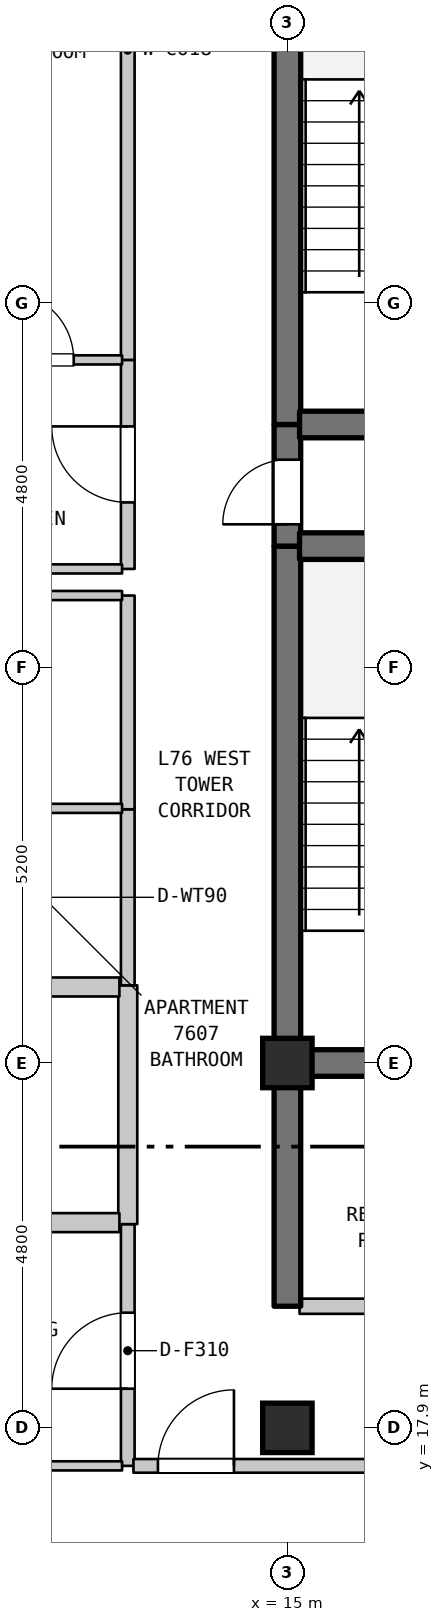
"""IFC4 building model, lengths in metres.
Left out: names, types, materials, properties, quantities, classifications, styles, units other than length and angle.
Written with IfcOpenShell. Run it as: python <this file> out.ifc"""

import sys

from ifc_helpers import new_model, si_unit, direction, frame, frame_2d, origin, origin_2d, place, context, subcontext, project, spatial, rectangle, extrude, element, fill, save


model = new_model("IFC4")
c1 = context("Model", 3, precision=1e-05, world=origin(), true_north=direction((0.0, 1.0)))
c2 = subcontext(c1, "Body", "Model", "MODEL_VIEW")
j1 = project(units=[si_unit("LENGTHUNIT", "METRE"), si_unit("PLANEANGLEUNIT", "RADIAN")], contexts=[c1])
p1 = place(None, origin())
s1 = spatial("IfcSite", under=j1, at=p1, CompositionType="ELEMENT")
p2 = place(p1, origin())
s2 = spatial("IfcBuilding", under=s1, at=p2, CompositionType="ELEMENT")
p3 = place(p2, frame((0.0, 0.0, 303.6)))
s3 = spatial("IfcBuildingStorey", under=s2, at=p3, CompositionType="ELEMENT", Elevation=303.6)
for number, where, z_axis, x_axis in (
    (1, (15.0, 17.9, 0.0), (0.0, 0.0, 1.0), (1.0, 0.0, 0.0)),
    (2, (15.0, 22.7, 0.0), (0.0, 0.0, 1.0), (1.0, 0.0, 0.0)),
):
    element("IfcColumn", number, at=place(p3, frame(where, z_axis=z_axis, x_axis=x_axis)), inside=s3, PredefinedType="COLUMN", context=c2, shape_type="SweptSolid", body=[
        extrude(rectangle(XDim=0.65, YDim=0.65, at=origin_2d()), origin(), (0.0, 0.0, 1.0), 3.7),
    ])
p4 = place(p3, frame((12.9, 17.4, 0.0), z_axis=(0.0, 0.0, 1.0), x_axis=(0.0, 1.0, 0.0)))
e3 = element("IfcWall", 3, at=p4, inside=s3, PredefinedType="STANDARD", context=c2, shape_type="SweptSolid", body=[
    extrude(rectangle(XDim=3.18, YDim=0.18, at=frame_2d((1.59, 0.0))), origin(), (0.0, 0.0, 1.0), 3.39),
])
p5 = place(p4, frame((1.015, 0.0, 0.0)))
e4 = element("IfcOpeningElement", 4, at=p5, cuts=e3, PredefinedType="OPENING", context=c2, shape_type="SweptSolid", body=[
    extrude(rectangle(XDim=1.0, YDim=2.15, at=frame_2d((0.5, 1.075))), frame((0.0, 0.1, 0.0), z_axis=(0.0, -1.0, 0.0), x_axis=(1.0, 0.0, 0.0)), (0.0, 0.0, 1.0), 0.2),
])
p6 = place(p3, frame((12.9, 20.58, 0.0), z_axis=(0.0, 0.0, 1.0), x_axis=(0.0, 1.0, 0.0)))
e5 = element("IfcWall", 5, at=p6, inside=s3, PredefinedType="STANDARD", context=c2, shape_type="SweptSolid", body=[
    extrude(rectangle(XDim=3.142, YDim=0.25, at=frame_2d((1.571, 0.0))), origin(), (0.0, 0.0, 1.0), 3.39),
])
p7 = place(p3, frame((12.9, 23.722, 0.0), z_axis=(0.0, 0.0, 1.0), x_axis=(0.0, 1.0, 0.0)))
e6 = element("IfcWall", 6, at=p7, inside=s3, PredefinedType="STANDARD", context=c2, shape_type="SweptSolid", body=[
    extrude(rectangle(XDim=2.316, YDim=0.18, at=frame_2d((1.158, 0.0))), origin(), (0.0, 0.0, 1.0), 3.39),
])
p8 = place(p3, frame((12.9, 26.038, 0.0), z_axis=(0.0, 0.0, 1.0), x_axis=(0.0, 1.0, 0.0)))
e7 = element("IfcWall", 7, at=p8, inside=s3, PredefinedType="STANDARD", context=c2, shape_type="SweptSolid", body=[
    extrude(rectangle(XDim=2.812, YDim=0.18, at=frame_2d((1.406, 0.0))), origin(), (0.0, 0.0, 1.0), 3.39),
])
p9 = place(p3, frame((12.9, 29.2, 0.0), z_axis=(0.0, 0.0, 1.0), x_axis=(0.0, 1.0, 0.0)))
e8 = element("IfcWall", 8, at=p9, inside=s3, PredefinedType="STANDARD", context=c2, shape_type="SweptSolid", body=[
    extrude(rectangle(XDim=2.75, YDim=0.18, at=frame_2d((1.375, 0.0))), origin(), (0.0, 0.0, 1.0), 3.39),
])
p10 = place(p9, frame((0.875, 0.0, 0.0)))
e9 = element("IfcOpeningElement", 9, at=p10, cuts=e8, PredefinedType="OPENING", context=c2, shape_type="SweptSolid", body=[
    extrude(rectangle(XDim=1.0, YDim=2.15, at=frame_2d((0.5, 1.075))), frame((0.0, 0.1, 0.0), z_axis=(0.0, -1.0, 0.0), x_axis=(1.0, 0.0, 0.0)), (0.0, 0.0, 1.0), 0.2),
])
p11 = place(p3, frame((12.9, 31.95, 0.0), z_axis=(0.0, 0.0, 1.0), x_axis=(0.0, 1.0, 0.0)))
e10 = element("IfcWall", 10, at=p11, inside=s3, PredefinedType="STANDARD", context=c2, shape_type="SweptSolid", body=[
    extrude(rectangle(XDim=8.15, YDim=0.18, at=frame_2d((4.075, 0.0))), origin(), (0.0, 0.0, 1.0), 3.39),
])
p12 = place(p3, frame((15.0, 19.5, 0.0), z_axis=(0.0, 0.0, 1.0), x_axis=(0.0, 1.0, 0.0)))
e11 = element("IfcWall", 11, at=p12, inside=s3, PredefinedType="SHEAR", context=c2, shape_type="SweptSolid", body=[
    extrude(rectangle(XDim=3.2, YDim=0.35, at=frame_2d((1.6, 0.0))), origin(), (0.0, 0.0, 1.0), 3.39),
])
p13 = place(p3, frame((15.0, 22.7, 0.0), z_axis=(0.0, 0.0, 1.0), x_axis=(0.0, 1.0, 0.0)))
e12 = element("IfcWall", 12, at=p13, inside=s3, PredefinedType="SHEAR", context=c2, shape_type="SweptSolid", body=[
    extrude(rectangle(XDim=6.8, YDim=0.35, at=frame_2d((3.4, 0.0))), origin(), (0.0, 0.0, 1.0), 3.39),
])
p14 = place(p3, frame((15.0, 29.5, 0.0), z_axis=(0.0, 0.0, 1.0), x_axis=(0.0, 1.0, 0.0)))
e13 = element("IfcWall", 13, at=p14, inside=s3, PredefinedType="SHEAR", context=c2, shape_type="SweptSolid", body=[
    extrude(rectangle(XDim=1.6, YDim=0.35, at=frame_2d((0.8, 0.0))), origin(), (0.0, 0.0, 1.0), 3.39),
])
p15 = place(p14, frame((0.287, 0.0, 0.0)))
e14 = element("IfcOpeningElement", 14, at=p15, cuts=e13, PredefinedType="OPENING", context=c2, shape_type="SweptSolid", body=[
    extrude(rectangle(XDim=0.85, YDim=2.1, at=frame_2d((0.425, 1.05))), frame((0.0, 0.185, 0.0), z_axis=(0.0, -1.0, 0.0), x_axis=(1.0, 0.0, 0.0)), (0.0, 0.0, 1.0), 0.37),
])
p16 = place(p3, frame((15.0, 31.1, 0.0), z_axis=(0.0, 0.0, 1.0), x_axis=(0.0, 1.0, 0.0)))
e15 = element("IfcWall", 15, at=p16, inside=s3, PredefinedType="SHEAR", context=c2, shape_type="SweptSolid", body=[
    extrude(rectangle(XDim=6.8, YDim=0.35, at=frame_2d((3.4, 0.0))), origin(), (0.0, 0.0, 1.0), 3.39),
])
p17 = place(p3, frame((8.973, 17.4, 0.0), z_axis=(0.0, 0.0, 1.0), x_axis=(1.0, 0.0, 0.0)))
e16 = element("IfcWall", 16, at=p17, inside=s3, PredefinedType="PARTITIONING", context=c2, shape_type="SweptSolid", body=[
    extrude(rectangle(XDim=3.852, YDim=0.12, at=frame_2d((1.926, 0.0))), origin(), (0.0, 0.0, 1.0), 3.39),
])
p18 = place(p3, frame((12.975, 17.4, 0.0), z_axis=(0.0, 0.0, 1.0), x_axis=(1.0, 0.0, 0.0)))
e17 = element("IfcWall", 17, at=p18, inside=s3, PredefinedType="STANDARD", context=c2, shape_type="SweptSolid", body=[
    extrude(rectangle(XDim=3.68, YDim=0.18, at=frame_2d((1.84, 0.0))), origin(), (0.0, 0.0, 1.0), 3.39),
])
p19 = place(p18, frame((0.322, 0.0, 0.0)))
e18 = element("IfcOpeningElement", 18, at=p19, cuts=e17, PredefinedType="OPENING", context=c2, shape_type="SweptSolid", body=[
    extrude(rectangle(XDim=1.0, YDim=2.15, at=frame_2d((0.5, 1.075))), frame((0.0, 0.1, 0.0), z_axis=(0.0, -1.0, 0.0), x_axis=(1.0, 0.0, 0.0)), (0.0, 0.0, 1.0), 0.2),
])
p20 = place(p3, frame((15.16, 19.5, 0.0), z_axis=(0.0, 0.0, 1.0), x_axis=(1.0, 0.0, 0.0)))
e19 = element("IfcWall", 19, at=p20, inside=s3, PredefinedType="STANDARD", context=c2, shape_type="SweptSolid", body=[
    extrude(rectangle(XDim=3.68, YDim=0.2, at=frame_2d((1.84, 0.0))), origin(), (0.0, 0.0, 1.0), 3.39),
])
p21 = place(p20, frame((1.39, 0.0, 0.0)))
e20 = element("IfcOpeningElement", 20, at=p21, cuts=e19, PredefinedType="OPENING", context=c2, shape_type="SweptSolid", body=[
    extrude(rectangle(XDim=0.9, YDim=2.15, at=frame_2d((0.45, 1.075))), frame((0.0, 0.11, 0.0), z_axis=(0.0, -1.0, 0.0), x_axis=(1.0, 0.0, 0.0)), (0.0, 0.0, 1.0), 0.22),
])
p22 = place(p3, frame((10.76, 20.6, 0.0), z_axis=(0.0, 0.0, 1.0), x_axis=(1.0, 0.0, 0.0)))
e21 = element("IfcWall", 21, at=p22, inside=s3, PredefinedType="STANDARD", context=c2, shape_type="SweptSolid", body=[
    extrude(rectangle(XDim=2.03, YDim=0.25, at=frame_2d((1.015, 0.0))), origin(), (0.0, 0.0, 1.0), 3.39),
])
p23 = place(p3, frame((15.16, 22.7, 0.0), z_axis=(0.0, 0.0, 1.0), x_axis=(1.0, 0.0, 0.0)))
e22 = element("IfcWall", 22, at=p23, inside=s3, PredefinedType="SHEAR", context=c2, shape_type="SweptSolid", body=[
    extrude(rectangle(XDim=3.68, YDim=0.35, at=frame_2d((1.84, 0.0))), origin(), (0.0, 0.0, 1.0), 3.39),
])
p24 = place(p3, frame((10.76, 23.7, 0.0), z_axis=(0.0, 0.0, 1.0), x_axis=(1.0, 0.0, 0.0)))
e23 = element("IfcWall", 23, at=p24, inside=s3, PredefinedType="STANDARD", context=c2, shape_type="SweptSolid", body=[
    extrude(rectangle(XDim=2.03, YDim=0.25, at=frame_2d((1.015, 0.0))), origin(), (0.0, 0.0, 1.0), 3.39),
])
for number, where, z_axis, x_axis in (
    (24, (10.695, 26.05, 0.0), (0.0, 0.0, 1.0), (1.0, 0.0, 0.0)),
    (25, (10.695, 28.85, 0.0), (0.0, 0.0, 1.0), (1.0, 0.0, 0.0)),
):
    element("IfcWall", number, at=place(p3, frame(where, z_axis=z_axis, x_axis=x_axis)), inside=s3, PredefinedType="PARTITIONING", context=c2, shape_type="SweptSolid", body=[
        extrude(rectangle(XDim=2.13, YDim=0.12, at=frame_2d((1.065, 0.0))), origin(), (0.0, 0.0, 1.0), 3.39),
    ])
p25 = place(p3, frame((9.13, 29.2, 0.0), z_axis=(0.0, 0.0, 1.0), x_axis=(1.0, 0.0, 0.0)))
e26 = element("IfcWall", 26, at=p25, inside=s3, PredefinedType="PARTITIONING", context=c2, shape_type="SweptSolid", body=[
    extrude(rectangle(XDim=3.695, YDim=0.12, at=frame_2d((1.848, 0.0))), origin(), (0.0, 0.0, 1.0), 3.39),
])
for number, where, z_axis, x_axis in (
    (27, (15.16, 29.5, 0.0), (0.0, 0.0, 1.0), (1.0, 0.0, 0.0)),
    (28, (15.16, 31.1, 0.0), (0.0, 0.0, 1.0), (1.0, 0.0, 0.0)),
):
    element("IfcWall", number, at=place(p3, frame(where, z_axis=z_axis, x_axis=x_axis)), inside=s3, PredefinedType="SHEAR", context=c2, shape_type="SweptSolid", body=[
        extrude(rectangle(XDim=3.68, YDim=0.35, at=frame_2d((1.84, 0.0))), origin(), (0.0, 0.0, 1.0), 3.39),
    ])
p26 = place(p3, frame((10.623, 31.95, 0.0), z_axis=(0.0, 0.0, 1.0), x_axis=(1.0, 0.0, 0.0)))
e29 = element("IfcWall", 29, at=p26, inside=s3, PredefinedType="PARTITIONING", context=c2, shape_type="SweptSolid", body=[
    extrude(rectangle(XDim=2.202, YDim=0.12, at=frame_2d((1.101, 0.0))), origin(), (0.0, 0.0, 1.0), 3.39),
])
p27 = place(p26, frame((0.666, 0.0, 0.0)))
e30 = element("IfcOpeningElement", 30, at=p27, cuts=e29, PredefinedType="OPENING", context=c2, shape_type="SweptSolid", body=[
    extrude(rectangle(XDim=0.9, YDim=2.1, at=frame_2d((0.45, 1.05))), frame((0.0, 0.07, 0.0), z_axis=(0.0, -1.0, 0.0), x_axis=(1.0, 0.0, 0.0)), (0.0, 0.0, 1.0), 0.14),
])
p28 = place(p5, origin())
e31 = element("IfcDoor", 31, at=p28, inside=s3, OperationType="SINGLE_SWING_LEFT", PredefinedType="DOOR", context=c2, shape_type="SweptSolid", body=[
    extrude(rectangle(XDim=1.0, YDim=2.15, at=frame_2d((0.5, 1.075))), frame((0.0, 0.025, 0.0), z_axis=(0.0, -1.0, 0.0), x_axis=(1.0, 0.0, 0.0)), (0.0, 0.0, 1.0), 0.05),
])
fill(e4, e31)
p29 = place(p10, origin())
e32 = element("IfcDoor", 32, at=p29, inside=s3, OperationType="SINGLE_SWING_RIGHT", PredefinedType="DOOR", context=c2, shape_type="SweptSolid", body=[
    extrude(rectangle(XDim=1.0, YDim=2.15, at=frame_2d((0.5, 1.075))), frame((0.0, 0.025, 0.0), z_axis=(0.0, -1.0, 0.0), x_axis=(1.0, 0.0, 0.0)), (0.0, 0.0, 1.0), 0.05),
])
fill(e9, e32)
p30 = place(p15, origin())
e33 = element("IfcDoor", 33, at=p30, inside=s3, OperationType="SINGLE_SWING_LEFT", PredefinedType="DOOR", context=c2, shape_type="SweptSolid", body=[
    extrude(rectangle(XDim=0.85, YDim=2.1, at=frame_2d((0.425, 1.05))), frame((0.0, 0.025, 0.0), z_axis=(0.0, -1.0, 0.0), x_axis=(1.0, 0.0, 0.0)), (0.0, 0.0, 1.0), 0.05),
])
fill(e14, e33)
p31 = place(p19, origin())
e34 = element("IfcDoor", 34, at=p31, inside=s3, OperationType="SINGLE_SWING_RIGHT", PredefinedType="DOOR", context=c2, shape_type="SweptSolid", body=[
    extrude(rectangle(XDim=1.0, YDim=2.15, at=frame_2d((0.5, 1.075))), frame((0.0, 0.025, 0.0), z_axis=(0.0, -1.0, 0.0), x_axis=(1.0, 0.0, 0.0)), (0.0, 0.0, 1.0), 0.05),
])
fill(e18, e34)
p32 = place(p27, origin())
e35 = element("IfcDoor", 35, at=p32, inside=s3, OperationType="SINGLE_SWING_LEFT", PredefinedType="DOOR", context=c2, shape_type="SweptSolid", body=[
    extrude(rectangle(XDim=0.9, YDim=2.1, at=frame_2d((0.45, 1.05))), frame((0.0, 0.025, 0.0), z_axis=(0.0, -1.0, 0.0), x_axis=(1.0, 0.0, 0.0)), (0.0, 0.0, 1.0), 0.05),
])
fill(e30, e35)
save(model, sys.argv[1])
